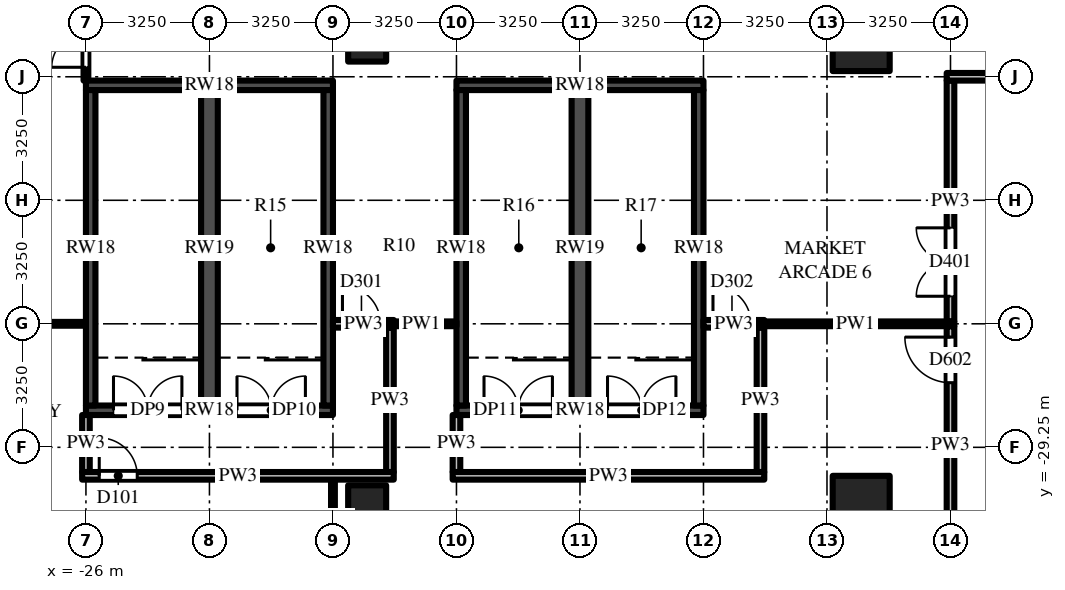
"""IFC4 building model, lengths in metres.
Left out: names, types, materials, properties, quantities, classifications, styles, units other than length and angle.
Written with IfcOpenShell. Run it as: python <this file> out.ifc"""

import sys

from ifc_helpers import new_model, si_unit, direction, frame, frame_2d, origin, origin_2d, place, context, subcontext, project, spatial, rectangle, extrude, source, transform, mapped, element, fill, save


model = new_model("IFC4")
c1 = context("Model", 3, precision=1e-05, world=origin(), true_north=direction((0.0, 1.0)))
c2 = subcontext(c1, "Body", "Model", "MODEL_VIEW")
j1 = project(units=[si_unit("LENGTHUNIT", "METRE"), si_unit("PLANEANGLEUNIT", "RADIAN")], contexts=[c1])
p1 = place(None, origin())
s1 = spatial("IfcSite", under=j1, at=p1, CompositionType="ELEMENT")
p2 = place(p1, origin())
s2 = spatial("IfcBuilding", under=s1, at=p2, CompositionType="ELEMENT")
p3 = place(p2, frame((0.0, 0.0, 29.0)))
s3 = spatial("IfcBuildingStorey", under=s2, at=p3, CompositionType="ELEMENT", Elevation=29.0)
m1 = source(origin(), c2, "Body", "SweptSolid", [
    extrude(rectangle(XDim=1.5, YDim=1.5, at=origin_2d()), origin(), (0.0, 0.0, 1.0), 5.0),
])
for number, where, z_axis, x_axis in (
    (1, (-5.6, -18.6, 0.0), (0.0, 0.0, 1.0), (1.0, 0.0, 0.0)),
    (2, (-5.6, -30.75, 0.0), (0.0, 0.0, 1.0), (1.0, 0.0, 0.0)),
):
    element("IfcColumn", number, at=place(p3, frame(where, z_axis=z_axis, x_axis=x_axis)), inside=s3, PredefinedType="COLUMN", context=c2, shape_type="MappedRepresentation", body=[
        mapped(m1, transform((0.0, 0.0, 0.0))),
    ])
m2 = source(origin(), c2, "Body", "SweptSolid", [
    extrude(rectangle(XDim=1.0, YDim=1.0, at=origin_2d()), origin(), (0.0, 0.0, 1.0), 5.0),
])
for number, where, z_axis, x_axis in (
    (3, (-18.6, -18.6, 0.0), (0.0, 0.0, 1.0), (1.0, 0.0, 0.0)),
    (4, (-18.6, -30.75, 0.0), (0.0, 0.0, 1.0), (1.0, 0.0, 0.0)),
):
    element("IfcColumn", number, at=place(p3, frame(where, z_axis=z_axis, x_axis=x_axis)), inside=s3, PredefinedType="COLUMN", context=c2, shape_type="MappedRepresentation", body=[
        mapped(m2, transform((0.0, 0.0, 0.0))),
    ])
m3 = source(origin(), c2, "Body", "SweptSolid", [
    extrude(rectangle(XDim=6.5, YDim=0.25, at=frame_2d((3.25, 0.0))), origin(), (0.0, 0.0, 1.0), 4.65),
])
p4 = place(p3, frame((-26.0, -28.275, 0.0), z_axis=(0.0, 0.0, 1.0), x_axis=(1.0, 0.0, 0.0)))
e5 = element("IfcWall", 5, at=p4, inside=s3, PredefinedType="SHEAR", context=c2, shape_type="MappedRepresentation", body=[
    mapped(m3, transform((0.0, 0.0, 0.0))),
])
m4 = source(origin(), c2, "Body", "SweptSolid", [
    extrude(rectangle(XDim=1.8, YDim=2.1, at=frame_2d((0.9, 1.05))), frame((0.0, 0.135, 0.0), z_axis=(0.0, -1.0, 0.0), x_axis=(1.0, 0.0, 0.0)), (0.0, 0.0, 1.0), 0.27),
])
p5 = place(p4, frame((0.725, 0.0, 0.0)))
e6 = element("IfcOpeningElement", 6, at=p5, cuts=e5, PredefinedType="OPENING", context=c2, shape_type="MappedRepresentation", body=[
    mapped(m4, transform((0.0, 0.0, 0.0))),
])
p6 = place(p4, frame((3.975, 0.0, 0.0)))
e7 = element("IfcOpeningElement", 7, at=p6, cuts=e5, PredefinedType="OPENING", context=c2, shape_type="MappedRepresentation", body=[
    mapped(m4, transform((0.0, 0.0, 0.0))),
])
p7 = place(p3, frame((-26.0, -19.725, 0.0), z_axis=(0.0, 0.0, 1.0), x_axis=(1.0, 0.0, 0.0)))
e8 = element("IfcWall", 8, at=p7, inside=s3, PredefinedType="SHEAR", context=c2, shape_type="MappedRepresentation", body=[
    mapped(m3, transform((0.0, 0.0, 0.0))),
])
m5 = source(origin(), c2, "Body", "SweptSolid", [
    extrude(rectangle(XDim=8.3, YDim=0.25, at=frame_2d((4.15, 0.0))), origin(), (0.0, 0.0, 1.0), 4.65),
])
for number, where, z_axis, x_axis in (
    (9, (-25.875, -28.15, 0.0), (0.0, 0.0, 1.0), (0.0, 1.0, 0.0)),
    (10, (-19.625, -28.15, 0.0), (0.0, 0.0, 1.0), (0.0, 1.0, 0.0)),
):
    element("IfcWall", number, at=place(p3, frame(where, z_axis=z_axis, x_axis=x_axis)), inside=s3, PredefinedType="SHEAR", context=c2, shape_type="MappedRepresentation", body=[
        mapped(m5, transform((0.0, 0.0, 0.0))),
    ])
m6 = source(origin(), c2, "Body", "SweptSolid", [
    extrude(rectangle(XDim=8.3, YDim=0.44, at=frame_2d((4.15, 0.0))), origin(), (0.0, 0.0, 1.0), 4.65),
])
p8 = place(p3, frame((-22.75, -28.15, 0.0), z_axis=(0.0, 0.0, 1.0), x_axis=(0.0, 1.0, 0.0)))
e11 = element("IfcWall", 11, at=p8, inside=s3, PredefinedType="SHEAR", context=c2, shape_type="MappedRepresentation", body=[
    mapped(m6, transform((0.0, 0.0, 0.0))),
])
p9 = place(p3, frame((-16.25, -28.275, 0.0), z_axis=(0.0, 0.0, 1.0), x_axis=(1.0, 0.0, 0.0)))
e12 = element("IfcWall", 12, at=p9, inside=s3, PredefinedType="SHEAR", context=c2, shape_type="MappedRepresentation", body=[
    mapped(m3, transform((0.0, 0.0, 0.0))),
])
p10 = place(p9, frame((0.725, 0.0, 0.0)))
e13 = element("IfcOpeningElement", 13, at=p10, cuts=e12, PredefinedType="OPENING", context=c2, shape_type="MappedRepresentation", body=[
    mapped(m4, transform((0.0, 0.0, 0.0))),
])
p11 = place(p9, frame((3.975, 0.0, 0.0)))
e14 = element("IfcOpeningElement", 14, at=p11, cuts=e12, PredefinedType="OPENING", context=c2, shape_type="MappedRepresentation", body=[
    mapped(m4, transform((0.0, 0.0, 0.0))),
])
p12 = place(p3, frame((-16.25, -19.725, 0.0), z_axis=(0.0, 0.0, 1.0), x_axis=(1.0, 0.0, 0.0)))
e15 = element("IfcWall", 15, at=p12, inside=s3, PredefinedType="SHEAR", context=c2, shape_type="MappedRepresentation", body=[
    mapped(m3, transform((0.0, 0.0, 0.0))),
])
for number, where, z_axis, x_axis in (
    (16, (-16.125, -28.15, 0.0), (0.0, 0.0, 1.0), (0.0, 1.0, 0.0)),
    (17, (-9.875, -28.15, 0.0), (0.0, 0.0, 1.0), (0.0, 1.0, 0.0)),
):
    element("IfcWall", number, at=place(p3, frame(where, z_axis=z_axis, x_axis=x_axis)), inside=s3, PredefinedType="SHEAR", context=c2, shape_type="MappedRepresentation", body=[
        mapped(m5, transform((0.0, 0.0, 0.0))),
    ])
p13 = place(p3, frame((-13.0, -28.15, 0.0), z_axis=(0.0, 0.0, 1.0), x_axis=(0.0, 1.0, 0.0)))
e18 = element("IfcWall", 18, at=p13, inside=s3, PredefinedType="SHEAR", context=c2, shape_type="MappedRepresentation", body=[
    mapped(m6, transform((0.0, 0.0, 0.0))),
])
m7 = source(origin(), c2, "Body", "SweptSolid", [
    extrude(rectangle(XDim=1.5, YDim=0.2, at=frame_2d((0.75, 0.0))), origin(), (0.0, 0.0, 1.0), 4.65),
])
p14 = place(p3, frame((-26.0, -29.9, 0.0), z_axis=(0.0, 0.0, 1.0), x_axis=(0.0, 1.0, 0.0)))
e19 = element("IfcWall", 19, at=p14, inside=s3, PredefinedType="PARTITIONING", context=c2, shape_type="MappedRepresentation", body=[
    mapped(m7, transform((0.0, 0.0, 0.0))),
])
m8 = source(origin(), c2, "Body", "SweptSolid", [
    extrude(rectangle(XDim=16.25, YDim=0.125, at=frame_2d((8.125, 0.0))), origin(), (0.0, 0.0, 1.0), 2.83),
])
p15 = place(p3, frame((-26.0, -19.6, 0.0), z_axis=(0.0, 0.0, 1.0), x_axis=(0.0, 1.0, 0.0)))
e20 = element("IfcWall", 20, at=p15, inside=s3, PredefinedType="PARTITIONING", context=c2, shape_type="MappedRepresentation", body=[
    mapped(m8, transform((0.0, 0.0, 0.0))),
])
m9 = source(origin(), c2, "Body", "SweptSolid", [
    extrude(rectangle(XDim=1.8, YDim=2.1, at=frame_2d((0.9, 1.05))), frame((0.0, 0.073, 0.0), z_axis=(0.0, -1.0, 0.0), x_axis=(1.0, 0.0, 0.0)), (0.0, 0.0, 1.0), 0.145),
])
p16 = place(p15, frame((0.35, 0.0, 0.0)))
e21 = element("IfcOpeningElement", 21, at=p16, cuts=e20, PredefinedType="OPENING", context=c2, shape_type="MappedRepresentation", body=[
    mapped(m9, transform((0.0, 0.0, 0.0))),
])
m10 = source(origin(), c2, "Body", "SweptSolid", [
    extrude(rectangle(XDim=2.2, YDim=0.1, at=frame_2d((1.1, 0.0))), origin(), (0.0, 0.0, 1.0), 3.73),
])
p17 = place(p3, frame((-19.5, -32.3, 0.0), z_axis=(0.0, 0.0, 1.0), x_axis=(0.0, 1.0, 0.0)))
e22 = element("IfcWall", 22, at=p17, inside=s3, PredefinedType="PARTITIONING", context=c2, shape_type="MappedRepresentation", body=[
    mapped(m10, transform((0.0, 0.0, 0.0))),
])
m11 = source(origin(), c2, "Body", "SweptSolid", [
    extrude(rectangle(XDim=3.8, YDim=0.2, at=frame_2d((1.9, 0.0))), origin(), (0.0, 0.0, 1.0), 4.224),
])
p18 = place(p3, frame((-18.0, -26.1, 0.0), z_axis=(0.0, 0.0, 1.0), x_axis=(0.0, -1.0, 0.0)))
e23 = element("IfcWall", 23, at=p18, inside=s3, PredefinedType="PARTITIONING", context=c2, shape_type="MappedRepresentation", body=[
    mapped(m11, transform((0.0, 0.0, 0.0))),
])
p19 = place(p3, frame((-16.25, -28.4, 0.0), z_axis=(0.0, 0.0, 1.0), x_axis=(0.0, -1.0, 0.0)))
e24 = element("IfcWall", 24, at=p19, inside=s3, PredefinedType="PARTITIONING", context=c2, shape_type="MappedRepresentation", body=[
    mapped(m7, transform((0.0, 0.0, 0.0))),
])
p20 = place(p3, frame((-8.25, -26.1, 0.0), z_axis=(0.0, 0.0, 1.0), x_axis=(0.0, -1.0, 0.0)))
e25 = element("IfcWall", 25, at=p20, inside=s3, PredefinedType="PARTITIONING", context=c2, shape_type="MappedRepresentation", body=[
    mapped(m11, transform((0.0, 0.0, 0.0))),
])
m12 = source(origin(), c2, "Body", "SweptSolid", [
    extrude(rectangle(XDim=3.188, YDim=0.2, at=frame_2d((1.594, 0.0))), origin(), (0.0, 0.0, 1.0), 4.65),
])
p21 = place(p3, frame((-3.25, -25.938, 0.0), z_axis=(0.0, 0.0, 1.0), x_axis=(0.0, 1.0, 0.0)))
e26 = element("IfcWall", 26, at=p21, inside=s3, PredefinedType="PARTITIONING", context=c2, shape_type="MappedRepresentation", body=[
    mapped(m12, transform((0.0, 0.0, 0.0))),
])
m13 = source(origin(), c2, "Body", "SweptSolid", [
    extrude(rectangle(XDim=1.8, YDim=2.1, at=frame_2d((0.9, 1.05))), frame((0.0, 0.11, 0.0), z_axis=(0.0, -1.0, 0.0), x_axis=(1.0, 0.0, 0.0)), (0.0, 0.0, 1.0), 0.22),
])
p22 = place(p21, frame((0.663, 0.0, 0.0)))
e27 = element("IfcOpeningElement", 27, at=p22, cuts=e26, PredefinedType="OPENING", context=c2, shape_type="MappedRepresentation", body=[
    mapped(m13, transform((0.0, 0.0, 0.0))),
])
m14 = source(origin(), c2, "Body", "SweptSolid", [
    extrude(rectangle(XDim=6.238, YDim=0.2, at=frame_2d((3.119, 0.0))), origin(), (0.0, 0.0, 1.0), 3.73),
])
p23 = place(p3, frame((-3.25, -32.3, 0.0), z_axis=(0.0, 0.0, 1.0), x_axis=(0.0, 1.0, 0.0)))
e28 = element("IfcWall", 28, at=p23, inside=s3, PredefinedType="PARTITIONING", context=c2, shape_type="MappedRepresentation", body=[
    mapped(m14, transform((0.0, 0.0, 0.0))),
])
m15 = source(origin(), c2, "Body", "SweptSolid", [
    extrude(rectangle(XDim=1.2, YDim=2.1, at=frame_2d((0.6, 1.05))), frame((0.0, 0.11, 0.0), z_axis=(0.0, -1.0, 0.0), x_axis=(1.0, 0.0, 0.0)), (0.0, 0.0, 1.0), 0.22),
])
p24 = place(p23, frame((4.75, 0.0, 0.0)))
e29 = element("IfcOpeningElement", 29, at=p24, cuts=e28, PredefinedType="OPENING", context=c2, shape_type="MappedRepresentation", body=[
    mapped(m15, transform((0.0, 0.0, 0.0))),
])
m16 = source(origin(), c2, "Body", "SweptSolid", [
    extrude(rectangle(XDim=3.15, YDim=0.2, at=frame_2d((1.575, 0.0))), origin(), (0.0, 0.0, 1.0), 4.65),
])
p25 = place(p3, frame((-3.25, -22.75, 0.0), z_axis=(0.0, 0.0, 1.0), x_axis=(0.0, 1.0, 0.0)))
e30 = element("IfcWall", 30, at=p25, inside=s3, PredefinedType="PARTITIONING", context=c2, shape_type="MappedRepresentation", body=[
    mapped(m16, transform((0.0, 0.0, 0.0))),
])
m17 = source(origin(), c2, "Body", "SweptSolid", [
    extrude(rectangle(XDim=8.2, YDim=0.2, at=frame_2d((4.1, 0.0))), origin(), (0.0, 0.0, 1.0), 3.712),
])
p26 = place(p3, frame((-26.1, -30.0, 0.0), z_axis=(0.0, 0.0, 1.0), x_axis=(1.0, 0.0, 0.0)))
e31 = element("IfcWall", 31, at=p26, inside=s3, PredefinedType="PARTITIONING", context=c2, shape_type="MappedRepresentation", body=[
    mapped(m17, transform((0.0, 0.0, 0.0))),
])
m18 = source(origin(), c2, "Body", "SweptSolid", [
    extrude(rectangle(XDim=1.0, YDim=2.1, at=frame_2d((0.5, 1.05))), frame((0.0, 0.11, 0.0), z_axis=(0.0, -1.0, 0.0), x_axis=(1.0, 0.0, 0.0)), (0.0, 0.0, 1.0), 0.22),
])
p27 = place(p26, frame((0.45, 0.0, 0.0)))
e32 = element("IfcOpeningElement", 32, at=p27, cuts=e31, PredefinedType="OPENING", context=c2, shape_type="MappedRepresentation", body=[
    mapped(m18, transform((0.0, 0.0, 0.0))),
])
m19 = source(origin(), c2, "Body", "SweptSolid", [
    extrude(rectangle(XDim=8.2, YDim=0.2, at=frame_2d((4.1, 0.0))), origin(), (0.0, 0.0, 1.0), 4.65),
])
p28 = place(p3, frame((-16.35, -30.0, 0.0), z_axis=(0.0, 0.0, 1.0), x_axis=(1.0, 0.0, 0.0)))
e33 = element("IfcWall", 33, at=p28, inside=s3, PredefinedType="PARTITIONING", context=c2, shape_type="MappedRepresentation", body=[
    mapped(m19, transform((0.0, 0.0, 0.0))),
])
m20 = source(origin(), c2, "Body", "SweptSolid", [
    extrude(rectangle(XDim=1.6, YDim=0.2, at=frame_2d((0.8, 0.0))), origin(), (0.0, 0.0, 1.0), 3.712),
])
p29 = place(p3, frame((-19.5, -26.0, 0.0), z_axis=(0.0, 0.0, 1.0), x_axis=(1.0, 0.0, 0.0)))
e34 = element("IfcWall", 34, at=p29, inside=s3, PredefinedType="PARTITIONING", context=c2, shape_type="MappedRepresentation", body=[
    mapped(m20, transform((0.0, 0.0, 0.0))),
])
p30 = place(p29, frame((0.25, 0.0, 0.0)))
e35 = element("IfcOpeningElement", 35, at=p30, cuts=e34, PredefinedType="OPENING", context=c2, shape_type="MappedRepresentation", body=[
    mapped(m18, transform((0.0, 0.0, 0.0))),
])
m21 = source(origin(), c2, "Body", "SweptSolid", [
    extrude(rectangle(XDim=1.6, YDim=0.2, at=frame_2d((0.8, 0.0))), origin(), (0.0, 0.0, 1.0), 4.65),
])
p31 = place(p3, frame((-9.75, -26.0, 0.0), z_axis=(0.0, 0.0, 1.0), x_axis=(1.0, 0.0, 0.0)))
e36 = element("IfcWall", 36, at=p31, inside=s3, PredefinedType="PARTITIONING", context=c2, shape_type="MappedRepresentation", body=[
    mapped(m21, transform((0.0, 0.0, 0.0))),
])
p32 = place(p31, frame((0.25, 0.0, 0.0)))
e37 = element("IfcOpeningElement", 37, at=p32, cuts=e36, PredefinedType="OPENING", context=c2, shape_type="MappedRepresentation", body=[
    mapped(m18, transform((0.0, 0.0, 0.0))),
])
m22 = source(origin(), c2, "Body", "SweptSolid", [
    extrude(rectangle(XDim=6.3, YDim=0.1, at=frame_2d((3.15, 0.0))), origin(), (0.0, 0.0, 1.0), 3.73),
])
p33 = place(p3, frame((-32.3, -26.0, 0.0), z_axis=(0.0, 0.0, 1.0), x_axis=(1.0, 0.0, 0.0)))
e38 = element("IfcWall", 38, at=p33, inside=s3, PredefinedType="PARTITIONING", context=c2, shape_type="MappedRepresentation", body=[
    mapped(m22, transform((0.0, 0.0, 0.0))),
])
m23 = source(origin(), c2, "Body", "SweptSolid", [
    extrude(rectangle(XDim=1.85, YDim=0.125, at=frame_2d((0.925, 0.0))), origin(), (0.0, 0.0, 1.0), 4.65),
])
p34 = place(p3, frame((-16.25, -26.0, 0.0), z_axis=(0.0, 0.0, 1.0), x_axis=(-1.0, 0.0, 0.0)))
e39 = element("IfcWall", 39, at=p34, inside=s3, PredefinedType="PARTITIONING", context=c2, shape_type="MappedRepresentation", body=[
    mapped(m23, transform((0.0, 0.0, 0.0))),
])
m24 = source(origin(), c2, "Body", "SweptSolid", [
    extrude(rectangle(XDim=5.2, YDim=0.125, at=frame_2d((2.6, 0.0))), origin(), (0.0, 0.0, 1.0), 2.83),
])
p35 = place(p3, frame((-3.15, -26.0, 0.0), z_axis=(0.0, 0.0, 1.0), x_axis=(-1.0, 0.0, 0.0)))
e40 = element("IfcWall", 40, at=p35, inside=s3, PredefinedType="PARTITIONING", context=c2, shape_type="MappedRepresentation", body=[
    mapped(m24, transform((0.0, 0.0, 0.0))),
])
m25 = source(origin(), c2, "Body", "SweptSolid", [
    extrude(rectangle(XDim=1.85, YDim=0.2, at=frame_2d((0.925, 0.0))), origin(), (0.0, 0.0, 1.0), 3.947),
])
p36 = place(p3, frame((-3.35, -19.5, 0.0), z_axis=(0.0, 0.0, 1.0), x_axis=(1.0, 0.0, 0.0)))
e41 = element("IfcWall", 41, at=p36, inside=s3, PredefinedType="PARTITIONING", context=c2, shape_type="MappedRepresentation", body=[
    mapped(m25, transform((0.0, 0.0, 0.0))),
])
m26 = source(origin(), c2, "Body", "SweptSolid", [
    extrude(rectangle(XDim=1.8, YDim=2.1, at=frame_2d((0.9, 1.05))), frame((0.0, 0.025, 0.0), z_axis=(0.0, -1.0, 0.0), x_axis=(1.0, 0.0, 0.0)), (0.0, 0.0, 1.0), 0.05),
])
p37 = place(p5, origin())
e42 = element("IfcDoor", 42, at=p37, inside=s3, OperationType="DOUBLE_DOOR_SINGLE_SWING", PredefinedType="DOOR", context=c2, shape_type="MappedRepresentation", body=[
    mapped(m26, transform((0.0, 0.0, 0.0))),
])
fill(e6, e42)
p38 = place(p6, origin())
e43 = element("IfcDoor", 43, at=p38, inside=s3, OperationType="DOUBLE_DOOR_SINGLE_SWING", PredefinedType="DOOR", context=c2, shape_type="MappedRepresentation", body=[
    mapped(m26, transform((0.0, 0.0, 0.0))),
])
fill(e7, e43)
p39 = place(p10, origin())
e44 = element("IfcDoor", 44, at=p39, inside=s3, OperationType="DOUBLE_DOOR_SINGLE_SWING", PredefinedType="DOOR", context=c2, shape_type="MappedRepresentation", body=[
    mapped(m26, transform((0.0, 0.0, 0.0))),
])
fill(e13, e44)
p40 = place(p11, origin())
e45 = element("IfcDoor", 45, at=p40, inside=s3, OperationType="DOUBLE_DOOR_SINGLE_SWING", PredefinedType="DOOR", context=c2, shape_type="MappedRepresentation", body=[
    mapped(m26, transform((0.0, 0.0, 0.0))),
])
fill(e14, e45)
m27 = source(origin(), c2, "Body", "SweptSolid", [
    extrude(rectangle(XDim=1.0, YDim=2.1, at=frame_2d((0.5, 1.05))), frame((0.0, 0.025, 0.0), z_axis=(0.0, -1.0, 0.0), x_axis=(1.0, 0.0, 0.0)), (0.0, 0.0, 1.0), 0.05),
])
p41 = place(p27, origin())
e46 = element("IfcDoor", 46, at=p41, inside=s3, OperationType="SINGLE_SWING_LEFT", PredefinedType="DOOR", context=c2, shape_type="MappedRepresentation", body=[
    mapped(m27, transform((0.0, 0.0, 0.0))),
])
fill(e32, e46)
m28 = source(origin(), c2, "Body", "SweptSolid", [
    extrude(rectangle(XDim=1.2, YDim=2.1, at=frame_2d((0.6, 1.05))), frame((0.0, 0.025, 0.0), z_axis=(0.0, -1.0, 0.0), x_axis=(1.0, 0.0, 0.0)), (0.0, 0.0, 1.0), 0.05),
])
p42 = place(p24, origin())
e47 = element("IfcDoor", 47, at=p42, inside=s3, OperationType="SINGLE_SWING_RIGHT", PredefinedType="DOOR", context=c2, shape_type="MappedRepresentation", body=[
    mapped(m28, transform((0.0, 0.0, 0.0))),
])
fill(e29, e47)
p43 = place(p30, origin())
e48 = element("IfcDoor", 48, at=p43, inside=s3, OperationType="SINGLE_SWING_LEFT", PredefinedType="DOOR", context=c2, shape_type="MappedRepresentation", body=[
    mapped(m27, transform((0.0, 0.0, 0.0))),
])
fill(e35, e48)
p44 = place(p32, origin())
e49 = element("IfcDoor", 49, at=p44, inside=s3, OperationType="SINGLE_SWING_LEFT", PredefinedType="DOOR", context=c2, shape_type="MappedRepresentation", body=[
    mapped(m27, transform((0.0, 0.0, 0.0))),
])
fill(e37, e49)
p45 = place(p22, origin())
e50 = element("IfcDoor", 50, at=p45, inside=s3, OperationType="DOUBLE_DOOR_SINGLE_SWING", PredefinedType="DOOR", context=c2, shape_type="MappedRepresentation", body=[
    mapped(m26, transform((0.0, 0.0, 0.0))),
])
fill(e27, e50)
p46 = place(p16, origin())
e51 = element("IfcDoor", 51, at=p46, inside=s3, OperationType="DOUBLE_DOOR_SINGLE_SWING", PredefinedType="DOOR", context=c2, shape_type="MappedRepresentation", body=[
    mapped(m26, transform((0.0, 0.0, 0.0))),
])
fill(e21, e51)
save(model, sys.argv[1])
